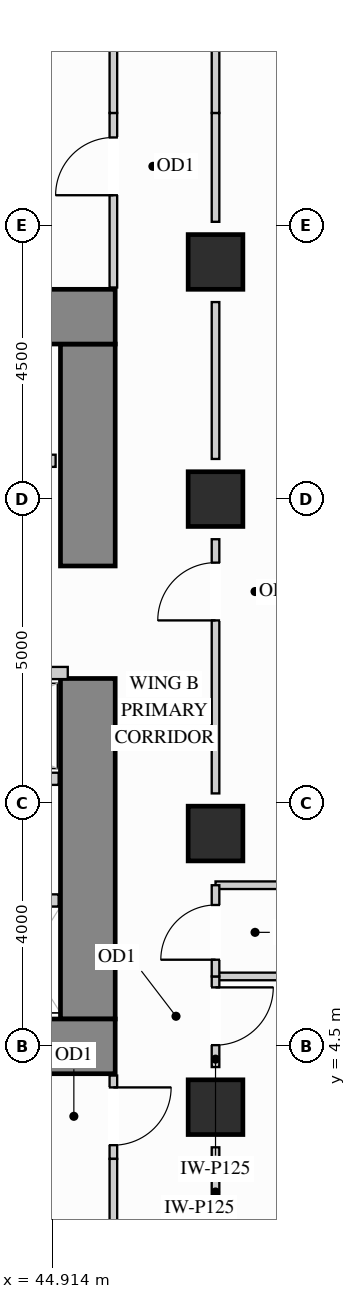
"""IFC4 building model, lengths in metres.
Left out: names, types, materials, properties, quantities, classifications, styles, units other than length and angle.
Written with IfcOpenShell. Run it as: python <this file> out.ifc"""

import sys

from ifc_helpers import new_model, si_unit, direction, frame, frame_2d, origin, origin_2d, place, context, subcontext, project, spatial, rectangle, extrude, source, transform, mapped, element, fill, save


model = new_model("IFC4")
c1 = context("Model", 3, precision=1e-05, world=origin(), true_north=direction((0.0, 1.0)))
c2 = subcontext(c1, "Body", "Model", "MODEL_VIEW")
j1 = project(units=[si_unit("LENGTHUNIT", "METRE"), si_unit("PLANEANGLEUNIT", "RADIAN")], contexts=[c1])
p1 = place(None, origin())
s1 = spatial("IfcSite", under=j1, at=p1, CompositionType="ELEMENT")
p2 = place(p1, origin())
s2 = spatial("IfcBuilding", under=s1, at=p2, CompositionType="ELEMENT")
p3 = place(p2, frame((0.0, 0.0, 36.9)))
s3 = spatial("IfcBuildingStorey", under=s2, at=p3, CompositionType="ELEMENT", Elevation=36.9)
m1 = source(origin(), c2, "Body", "SweptSolid", [
    extrude(rectangle(XDim=0.9, YDim=0.9, at=origin_2d()), origin(), (0.0, 0.0, 1.0), 3.38),
])
for number, where, z_axis, x_axis in (
    (1, (47.6, 13.5, 0.0), (0.0, 0.0, 1.0), (1.0, 0.0, 0.0)),
    (2, (47.6, 3.5, 0.0), (0.0, 0.0, 1.0), (1.0, 0.0, 0.0)),
    (3, (47.6, 8.0, 0.0), (0.0, 0.0, 1.0), (1.0, 0.0, 0.0)),
    (4, (47.6, 17.4, 0.0), (0.0, 0.0, 1.0), (1.0, 0.0, 0.0)),
):
    element("IfcColumn", number, at=place(p3, frame(where, z_axis=z_axis, x_axis=x_axis)), inside=s3, PredefinedType="COLUMN", context=c2, shape_type="MappedRepresentation", body=[
        mapped(m1, transform((0.0, 0.0, 0.0), x_axis=(1.0, 0.0, 0.0), y_axis=(0.0, 1.0, 0.0), z_axis=(0.0, 0.0, 1.0))),
    ])
m2 = source(origin(), c2, "Body", "SweptSolid", [
    extrude(rectangle(XDim=5.6, YDim=0.9, at=frame_2d((2.8, 0.0))), origin(), (0.0, 0.0, 1.0), 3.38),
])
p4 = place(p3, frame((45.5, 4.95, 0.0), z_axis=(0.0, 0.0, 1.0), x_axis=(0.0, 1.0, 0.0)))
e5 = element("IfcWall", 5, at=p4, inside=s3, PredefinedType="SHEAR", context=c2, shape_type="MappedRepresentation", body=[
    mapped(m2, transform((0.0, 0.0, 0.0), x_axis=(1.0, 0.0, 0.0), y_axis=(0.0, 1.0, 0.0), z_axis=(0.0, 0.0, 1.0))),
])
m3 = source(origin(), c2, "Body", "SweptSolid", [
    extrude(rectangle(XDim=3.65, YDim=0.9, at=frame_2d((1.825, 0.0))), origin(), (0.0, 0.0, 1.0), 3.38),
])
p5 = place(p3, frame((45.5, 12.4, 0.0), z_axis=(0.0, 0.0, 1.0), x_axis=(0.0, 1.0, 0.0)))
e6 = element("IfcWall", 6, at=p5, inside=s3, PredefinedType="SHEAR", context=c2, shape_type="MappedRepresentation", body=[
    mapped(m3, transform((0.0, 0.0, 0.0), x_axis=(1.0, 0.0, 0.0), y_axis=(0.0, 1.0, 0.0), z_axis=(0.0, 0.0, 1.0))),
])
m4 = source(origin(), c2, "Body", "SweptSolid", [
    extrude(rectangle(XDim=10.4, YDim=0.9, at=frame_2d((5.2, 0.0))), origin(), (0.0, 0.0, 1.0), 3.38),
])
for number, where, z_axis, x_axis in (
    (7, (35.55, 16.5, 0.0), (0.0, 0.0, 1.0), (1.0, 0.0, 0.0)),
    (8, (35.55, 4.5, 0.0), (0.0, 0.0, 1.0), (1.0, 0.0, 0.0)),
):
    element("IfcWall", number, at=place(p3, frame(where, z_axis=z_axis, x_axis=x_axis)), inside=s3, PredefinedType="SHEAR", context=c2, shape_type="MappedRepresentation", body=[
        mapped(m4, transform((0.0, 0.0, 0.0), x_axis=(1.0, 0.0, 0.0), y_axis=(0.0, 1.0, 0.0), z_axis=(0.0, 0.0, 1.0))),
    ])
m5 = source(origin(), c2, "Body", "SweptSolid", [
    extrude(rectangle(XDim=11.048, YDim=0.125, at=frame_2d((5.524, 0.0))), origin(), (0.0, 0.0, 1.0), 3.365),
])
for number, where, z_axis, x_axis in (
    (9, (47.6, 5.65, 0.0), (0.0, 0.0, 1.0), (1.0, 0.0, 0.0)),
    (10, (47.6, 7.15, 0.0), (0.0, 0.0, 1.0), (1.0, 0.0, 0.0)),
):
    element("IfcWall", number, at=place(p3, frame(where, z_axis=z_axis, x_axis=x_axis)), inside=s3, PredefinedType="PARTITIONING", context=c2, shape_type="MappedRepresentation", body=[
        mapped(m5, transform((0.0, 0.0, 0.0), x_axis=(1.0, 0.0, 0.0), y_axis=(0.0, 1.0, 0.0), z_axis=(0.0, 0.0, 1.0))),
    ])
p6 = place(p3, frame((47.6, 4.16, 0.0), z_axis=(0.0, 0.0, 1.0), x_axis=(0.0, 1.0, 0.0)))
e11 = element("IfcWall", 11, at=p6, inside=s3, PredefinedType="PARTITIONING", context=c2, shape_type="SweptSolid", body=[
    extrude(rectangle(XDim=1.49, YDim=0.125, at=frame_2d((0.745, 0.0))), origin(), (0.0, 0.0, 1.0), 2.67),
])
p7 = place(p6, frame((0.36, 0.0, 0.0)))
e12 = element("IfcOpeningElement", 12, at=p7, cuts=e11, PredefinedType="OPENING", context=c2, shape_type="SweptSolid", body=[
    extrude(rectangle(XDim=0.95, YDim=2.15, at=frame_2d((0.475, 1.075))), frame((0.0, 0.073, 0.0), z_axis=(0.0, -1.0, 0.0), x_axis=(1.0, 0.0, 0.0)), (0.0, 0.0, 1.0), 0.145),
])
m6 = source(origin(), c2, "Body", "SweptSolid", [
    extrude(rectangle(XDim=1.58, YDim=0.125, at=frame_2d((0.79, 0.0))), origin(), (0.0, 0.0, 1.0), 2.67),
])
p8 = place(p3, frame((47.6, 1.26, 0.0), z_axis=(0.0, 0.0, 1.0), x_axis=(0.0, 1.0, 0.0)))
e13 = element("IfcWall", 13, at=p8, inside=s3, PredefinedType="PARTITIONING", context=c2, shape_type="MappedRepresentation", body=[
    mapped(m6, transform((0.0, 0.0, 0.0), x_axis=(1.0, 0.0, 0.0), y_axis=(0.0, 1.0, 0.0), z_axis=(0.0, 0.0, 1.0))),
])
p9 = place(p3, frame((47.6, 8.66, 0.0), z_axis=(0.0, 0.0, 1.0), x_axis=(0.0, 1.0, 0.0)))
e14 = element("IfcWall", 14, at=p9, inside=s3, PredefinedType="PARTITIONING", context=c2, shape_type="SweptSolid", body=[
    extrude(rectangle(XDim=4.18, YDim=0.125, at=frame_2d((2.09, 0.0))), origin(), (0.0, 0.0, 1.0), 2.67),
])
p10 = place(p9, frame((2.845, 0.0, 0.0)))
e15 = element("IfcOpeningElement", 15, at=p10, cuts=e14, PredefinedType="OPENING", context=c2, shape_type="SweptSolid", body=[
    extrude(rectangle(XDim=0.95, YDim=2.15, at=frame_2d((0.475, 1.075))), frame((0.0, 0.073, 0.0), z_axis=(0.0, -1.0, 0.0), x_axis=(1.0, 0.0, 0.0)), (0.0, 0.0, 1.0), 0.145),
])
m7 = source(origin(), c2, "Body", "SweptSolid", [
    extrude(rectangle(XDim=2.58, YDim=0.125, at=frame_2d((1.29, 0.0))), origin(), (0.0, 0.0, 1.0), 2.67),
])
p11 = place(p3, frame((47.6, 14.16, 0.0), z_axis=(0.0, 0.0, 1.0), x_axis=(0.0, 1.0, 0.0)))
e16 = element("IfcWall", 16, at=p11, inside=s3, PredefinedType="PARTITIONING", context=c2, shape_type="MappedRepresentation", body=[
    mapped(m7, transform((0.0, 0.0, 0.0), x_axis=(1.0, 0.0, 0.0), y_axis=(0.0, 1.0, 0.0), z_axis=(0.0, 0.0, 1.0))),
])
m8 = source(origin(), c2, "Body", "SweptSolid", [
    extrude(rectangle(XDim=1.79, YDim=0.125, at=frame_2d((0.895, 0.0))), origin(), (0.0, 0.0, 1.0), 2.67),
])
p12 = place(p3, frame((47.6, 18.06, 0.0), z_axis=(0.0, 0.0, 1.0), x_axis=(0.0, 1.0, 0.0)))
e17 = element("IfcWall", 17, at=p12, inside=s3, PredefinedType="PARTITIONING", context=c2, shape_type="MappedRepresentation", body=[
    mapped(m8, transform((0.0, 0.0, 0.0), x_axis=(1.0, 0.0, 0.0), y_axis=(0.0, 1.0, 0.0), z_axis=(0.0, 0.0, 1.0))),
])
m9 = source(origin(), c2, "Body", "SweptSolid", [
    extrude(rectangle(XDim=1.39, YDim=0.125, at=frame_2d((0.695, 0.0))), origin(), (0.0, 0.0, 1.0), 2.67),
])
p13 = place(p3, frame((47.6, 19.85, 0.0), z_axis=(0.0, 0.0, 1.0), x_axis=(0.0, 1.0, 0.0)))
e18 = element("IfcWall", 18, at=p13, inside=s3, PredefinedType="PARTITIONING", context=c2, shape_type="MappedRepresentation", body=[
    mapped(m9, transform((0.0, 0.0, 0.0), x_axis=(1.0, 0.0, 0.0), y_axis=(0.0, 1.0, 0.0), z_axis=(0.0, 0.0, 1.0))),
])
p14 = place(p3, frame((47.6, 5.65, 0.0), z_axis=(0.0, 0.0, 1.0), x_axis=(0.0, 1.0, 0.0)))
e19 = element("IfcWall", 19, at=p14, inside=s3, PredefinedType="PARTITIONING", context=c2, shape_type="SweptSolid", body=[
    extrude(rectangle(XDim=1.5, YDim=0.125, at=frame_2d((0.75, 0.0))), origin(), (0.0, 0.0, 1.0), 2.67),
])
p15 = place(p14, frame((0.275, 0.0, 0.0)))
e20 = element("IfcOpeningElement", 20, at=p15, cuts=e19, PredefinedType="OPENING", context=c2, shape_type="SweptSolid", body=[
    extrude(rectangle(XDim=0.9, YDim=2.15, at=frame_2d((0.45, 1.075))), frame((0.0, 0.073, 0.0), z_axis=(0.0, -1.0, 0.0), x_axis=(1.0, 0.0, 0.0)), (0.0, 0.0, 1.0), 0.145),
])
p16 = place(p3, frame((45.92, 16.98, 0.0), z_axis=(0.0, 0.0, 1.0), x_axis=(0.0, 1.0, 0.0)))
e21 = element("IfcWall", 21, at=p16, inside=s3, PredefinedType="PARTITIONING", context=c2, shape_type="SweptSolid", body=[
    extrude(rectangle(XDim=2.87, YDim=0.125, at=frame_2d((1.435, 0.0))), origin(), (0.0, 0.0, 1.0), 3.365),
])
p17 = place(p16, frame((1.517, 0.0, 0.0)))
e22 = element("IfcOpeningElement", 22, at=p17, cuts=e21, PredefinedType="OPENING", context=c2, shape_type="SweptSolid", body=[
    extrude(rectangle(XDim=0.95, YDim=2.15, at=frame_2d((0.475, 1.075))), frame((0.0, 0.073, 0.0), z_axis=(0.0, -1.0, 0.0), x_axis=(1.0, 0.0, 0.0)), (0.0, 0.0, 1.0), 0.145),
])
m10 = source(origin(), c2, "Body", "SweptSolid", [
    extrude(rectangle(XDim=2.298, YDim=0.125, at=frame_2d((1.149, 0.0))), origin(), (0.0, 0.0, 1.0), 3.365),
])
p18 = place(p3, frame((45.92, 19.85, 0.0), z_axis=(0.0, 0.0, 1.0), x_axis=(0.0, 1.0, 0.0)))
e23 = element("IfcWall", 23, at=p18, inside=s3, PredefinedType="PARTITIONING", context=c2, shape_type="MappedRepresentation", body=[
    mapped(m10, transform((0.0, 0.0, 0.0), x_axis=(1.0, 0.0, 0.0), y_axis=(0.0, 1.0, 0.0), z_axis=(0.0, 0.0, 1.0))),
])
p19 = place(p3, frame((45.92, 2.65, 0.0), z_axis=(0.0, 0.0, 1.0), x_axis=(0.0, 1.0, 0.0)))
e24 = element("IfcWall", 24, at=p19, inside=s3, PredefinedType="PARTITIONING", context=c2, shape_type="SweptSolid", body=[
    extrude(rectangle(XDim=1.37, YDim=0.125, at=frame_2d((0.685, 0.0))), origin(), (0.0, 0.0, 1.0), 3.365),
])
p20 = place(p19, frame((0.225, 0.0, 0.0)))
e25 = element("IfcOpeningElement", 25, at=p20, cuts=e24, PredefinedType="OPENING", context=c2, shape_type="SweptSolid", body=[
    extrude(rectangle(XDim=0.95, YDim=2.15, at=frame_2d((0.475, 1.075))), frame((0.0, 0.073, 0.0), z_axis=(0.0, -1.0, 0.0), x_axis=(1.0, 0.0, 0.0)), (0.0, 0.0, 1.0), 0.145),
])
p21 = place(p3, frame((45.92, 0.352, 0.0), z_axis=(0.0, 0.0, 1.0), x_axis=(0.0, 1.0, 0.0)))
e26 = element("IfcWall", 26, at=p21, inside=s3, PredefinedType="PARTITIONING", context=c2, shape_type="MappedRepresentation", body=[
    mapped(m10, transform((0.0, 0.0, 0.0), x_axis=(1.0, 0.0, 0.0), y_axis=(0.0, 1.0, 0.0), z_axis=(0.0, 0.0, 1.0))),
])
m11 = source(origin(), c2, "Body", "SweptSolid", [
    extrude(rectangle(XDim=1.17, YDim=0.2, at=frame_2d((0.585, 0.0))), origin(), (0.0, 0.0, 1.0), 3.365),
])
p22 = place(p3, frame((43.85, 6.9, 0.0), z_axis=(0.0, 0.0, 1.0), x_axis=(1.0, 0.0, 0.0)))
e27 = element("IfcWall", 27, at=p22, inside=s3, PredefinedType="PARTITIONING", context=c2, shape_type="MappedRepresentation", body=[
    mapped(m11, transform((0.0, 0.0, 0.0), x_axis=(1.0, 0.0, 0.0), y_axis=(0.0, 1.0, 0.0), z_axis=(0.0, 0.0, 1.0))),
])
p23 = place(p3, frame((42.23, 14.13, 0.0), z_axis=(0.0, 0.0, 1.0), x_axis=(1.0, 0.0, 0.0)))
e28 = element("IfcWall", 28, at=p23, inside=s3, PredefinedType="PARTITIONING", context=c2, shape_type="SweptSolid", body=[
    extrude(rectangle(XDim=2.74, YDim=0.2, at=frame_2d((1.37, 0.0))), origin(), (0.0, 0.0, 1.0), 3.365),
])
p24 = place(p23, frame((0.82, 0.0, 0.0)))
e29 = element("IfcOpeningElement", 29, at=p24, cuts=e28, PredefinedType="OPENING", context=c2, shape_type="SweptSolid", body=[
    extrude(rectangle(XDim=1.1, YDim=2.2, at=frame_2d((0.55, 1.1))), frame((0.0, 0.11, 0.0), z_axis=(0.0, -1.0, 0.0), x_axis=(1.0, 0.0, 0.0)), (0.0, 0.0, 1.0), 0.22),
])
m12 = source(origin(), c2, "Body", "SweptSolid", [
    extrude(rectangle(XDim=3.49, YDim=0.2, at=frame_2d((1.745, 0.0))), origin(), (0.0, 0.0, 1.0), 3.365),
])
p25 = place(p3, frame((41.68, 10.64, 0.0), z_axis=(0.0, 0.0, 1.0), x_axis=(1.0, 0.0, 0.0)))
e30 = element("IfcWall", 30, at=p25, inside=s3, PredefinedType="PARTITIONING", context=c2, shape_type="MappedRepresentation", body=[
    mapped(m12, transform((0.0, 0.0, 0.0), x_axis=(1.0, 0.0, 0.0), y_axis=(0.0, 1.0, 0.0), z_axis=(0.0, 0.0, 1.0))),
])
m13 = source(origin(), c2, "Body", "SweptSolid", [
    extrude(rectangle(XDim=3.34, YDim=0.2, at=frame_2d((1.67, 0.0))), origin(), (0.0, 0.0, 1.0), 3.365),
])
p26 = place(p3, frame((41.68, 8.9, 0.0), z_axis=(0.0, 0.0, 1.0), x_axis=(1.0, 0.0, 0.0)))
e31 = element("IfcWall", 31, at=p26, inside=s3, PredefinedType="PARTITIONING", context=c2, shape_type="MappedRepresentation", body=[
    mapped(m13, transform((0.0, 0.0, 0.0), x_axis=(1.0, 0.0, 0.0), y_axis=(0.0, 1.0, 0.0), z_axis=(0.0, 0.0, 1.0))),
])
m14 = source(origin(), c2, "Body", "SweptSolid", [
    extrude(rectangle(XDim=0.95, YDim=2.15, at=frame_2d((0.475, 1.075))), frame((0.0, 0.025, 0.0), z_axis=(0.0, -1.0, 0.0), x_axis=(1.0, 0.0, 0.0)), (0.0, 0.0, 1.0), 0.05),
])
p27 = place(p17, origin())
e32 = element("IfcDoor", 32, at=p27, inside=s3, OperationType="SINGLE_SWING_LEFT", PredefinedType="DOOR", context=c2, shape_type="MappedRepresentation", body=[
    mapped(m14, transform((0.0, 0.0, 0.0), x_axis=(1.0, 0.0, 0.0), y_axis=(0.0, 1.0, 0.0), z_axis=(0.0, 0.0, 1.0))),
])
fill(e22, e32)
p28 = place(p20, origin())
e33 = element("IfcDoor", 33, at=p28, inside=s3, OperationType="SINGLE_SWING_RIGHT", PredefinedType="DOOR", context=c2, shape_type="MappedRepresentation", body=[
    mapped(m14, transform((0.0, 0.0, 0.0), x_axis=(1.0, 0.0, 0.0), y_axis=(0.0, 1.0, 0.0), z_axis=(0.0, 0.0, 1.0))),
])
fill(e25, e33)
p29 = place(p7, origin())
e34 = element("IfcDoor", 34, at=p29, inside=s3, OperationType="SINGLE_SWING_RIGHT", PredefinedType="DOOR", context=c2, shape_type="MappedRepresentation", body=[
    mapped(m14, transform((0.0, 0.0, 0.0), x_axis=(1.0, 0.0, 0.0), y_axis=(0.0, 1.0, 0.0), z_axis=(0.0, 0.0, 1.0))),
])
fill(e12, e34)
p30 = place(p10, origin())
e35 = element("IfcDoor", 35, at=p30, inside=s3, OperationType="SINGLE_SWING_LEFT", PredefinedType="DOOR", context=c2, shape_type="MappedRepresentation", body=[
    mapped(m14, transform((0.0, 0.0, 0.0), x_axis=(1.0, 0.0, 0.0), y_axis=(0.0, 1.0, 0.0), z_axis=(0.0, 0.0, 1.0))),
])
fill(e15, e35)
m15 = source(origin(), c2, "Body", "SweptSolid", [
    extrude(rectangle(XDim=0.9, YDim=2.15, at=frame_2d((0.45, 1.075))), frame((0.0, 0.025, 0.0), z_axis=(0.0, -1.0, 0.0), x_axis=(1.0, 0.0, 0.0)), (0.0, 0.0, 1.0), 0.05),
])
p31 = place(p15, origin())
e36 = element("IfcDoor", 36, at=p31, inside=s3, OperationType="SINGLE_SWING_LEFT", PredefinedType="DOOR", context=c2, shape_type="MappedRepresentation", body=[
    mapped(m15, transform((0.0, 0.0, 0.0), x_axis=(1.0, 0.0, 0.0), y_axis=(0.0, 1.0, 0.0), z_axis=(0.0, 0.0, 1.0))),
])
fill(e20, e36)
save(model, sys.argv[1])
